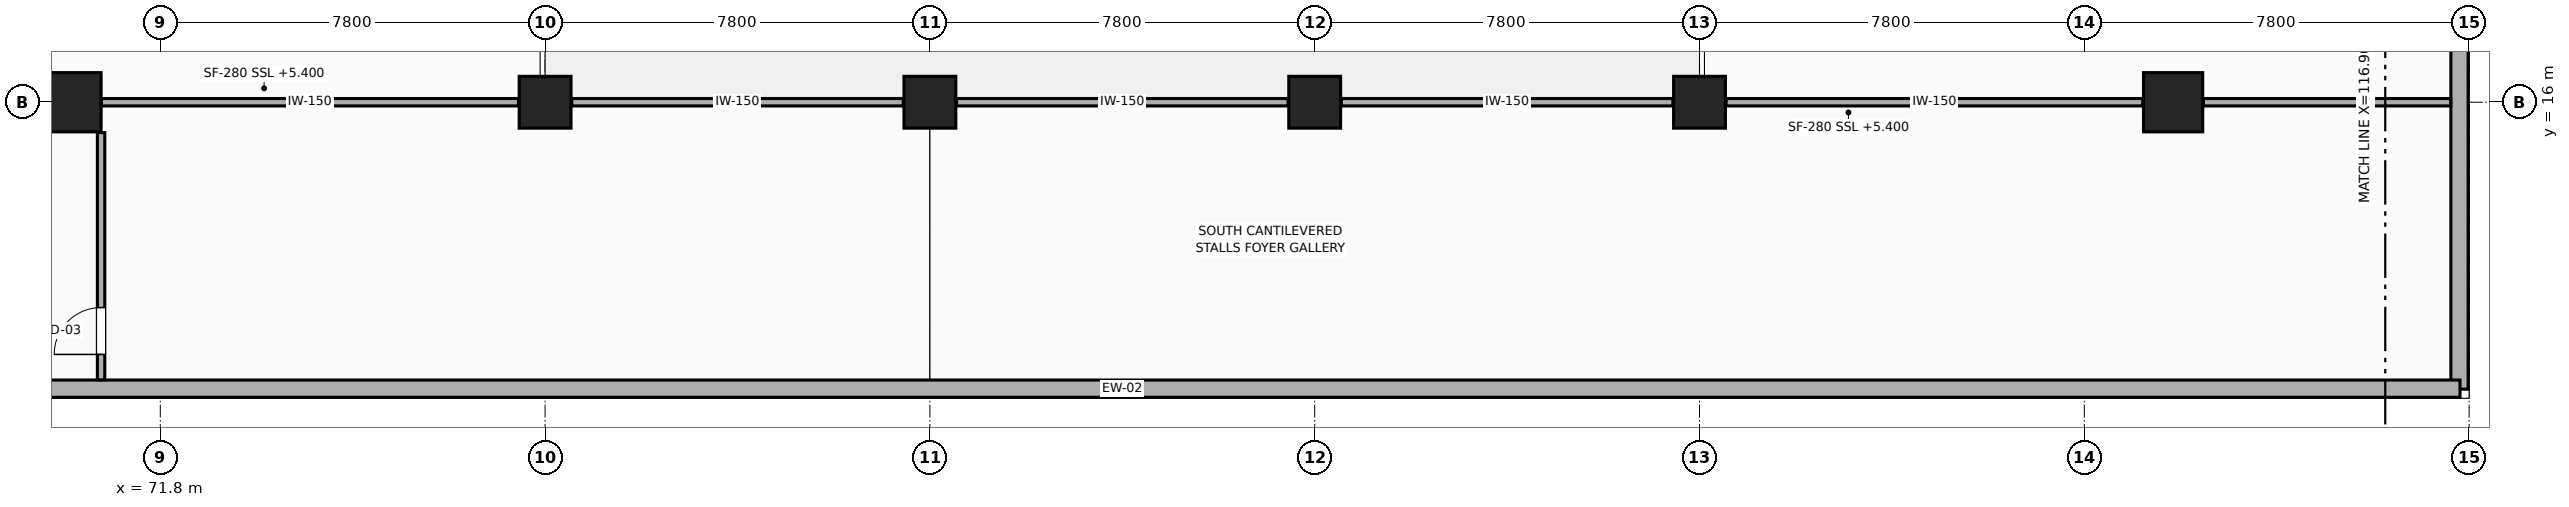
"""IFC4 building model, lengths in metres.
Left out: names, types, materials, properties, quantities, classifications, styles, units other than length and angle.
Written with IfcOpenShell. Run it as: python <this file> out.ifc"""

import sys

from ifc_helpers import new_model, si_unit, direction, frame, frame_2d, origin, origin_2d, place, context, subcontext, project, spatial, rectangle, extrude, element, fill, save


model = new_model("IFC4")
c1 = context("Model", 3, precision=1e-05, world=origin(), true_north=direction((0.0, 1.0)))
c2 = subcontext(c1, "Body", "Model", "MODEL_VIEW")
j1 = project(units=[si_unit("LENGTHUNIT", "METRE"), si_unit("PLANEANGLEUNIT", "RADIAN")], contexts=[c1])
p1 = place(None, origin())
s1 = spatial("IfcSite", under=j1, at=p1, CompositionType="ELEMENT")
p2 = place(p1, origin())
s2 = spatial("IfcBuilding", under=s1, at=p2, CompositionType="ELEMENT")
p3 = place(p2, frame((0.0, 0.0, 5.4)))
s3 = spatial("IfcBuildingStorey", under=s2, at=p3, CompositionType="ELEMENT", Elevation=5.4)
p4 = place(p3, frame((70.0, 16.0, 0.0), z_axis=(0.0, 0.0, 1.0), x_axis=(1.0, 0.0, 0.0)))
e1 = element("IfcColumn", 1, at=p4, inside=s3, PredefinedType="COLUMN", context=c2, shape_type="SweptSolid", body=[
    extrude(rectangle(XDim=1.2, YDim=1.2, at=origin_2d()), origin(), (0.0, 0.0, 1.0), 4.8),
])
for number, where, z_axis, x_axis in (
    (2, (79.6, 16.0, 0.0), (0.0, 0.0, 1.0), (1.0, 0.0, 0.0)),
    (3, (87.4, 16.0, 0.0), (0.0, 0.0, 1.0), (1.0, 0.0, 0.0)),
    (4, (95.2, 16.0, 0.0), (0.0, 0.0, 1.0), (1.0, 0.0, 0.0)),
    (5, (103.0, 16.0, 0.0), (0.0, 0.0, 1.0), (1.0, 0.0, 0.0)),
):
    element("IfcColumn", number, at=place(p3, frame(where, z_axis=z_axis, x_axis=x_axis)), inside=s3, PredefinedType="COLUMN", context=c2, shape_type="SweptSolid", body=[
        extrude(rectangle(XDim=1.05, YDim=1.05, at=origin_2d()), origin(), (0.0, 0.0, 1.0), 4.8),
    ])
p5 = place(p3, frame((112.6, 16.0, 0.0), z_axis=(0.0, 0.0, 1.0), x_axis=(1.0, 0.0, 0.0)))
e6 = element("IfcColumn", 6, at=p5, inside=s3, PredefinedType="COLUMN", context=c2, shape_type="SweptSolid", body=[
    extrude(rectangle(XDim=1.2, YDim=1.2, at=origin_2d()), origin(), (0.0, 0.0, 1.0), 4.8),
])
p6 = place(p3, frame((118.405, 23.815, 0.0), z_axis=(0.0, 0.0, 1.0), x_axis=(0.0, -1.0, 0.0)))
e7 = element("IfcWall", 7, at=p6, inside=s3, PredefinedType="STANDARD", context=c2, shape_type="SweptSolid", body=[
    extrude(rectangle(XDim=13.63, YDim=0.35, at=frame_2d((6.815, 0.0))), origin(), (0.0, 0.0, 1.0), 3.725),
])
p7 = place(p3, frame((118.415, 10.195, 0.0), z_axis=(0.0, 0.0, 1.0), x_axis=(-1.0, 0.0, 0.0)))
e8 = element("IfcWall", 8, at=p7, inside=s3, PredefinedType="STANDARD", context=c2, shape_type="SweptSolid", body=[
    extrude(rectangle(XDim=54.23, YDim=0.35, at=frame_2d((27.115, 0.0))), origin(), (0.0, 0.0, 1.0), 3.725),
])
p8 = place(p3, frame((70.604, 16.0, 0.0), z_axis=(0.0, 0.0, 1.0), x_axis=(1.0, 0.0, 0.0)))
e9 = element("IfcWall", 9, at=p8, inside=s3, PredefinedType="PARTITIONING", context=c2, shape_type="SweptSolid", body=[
    extrude(rectangle(XDim=8.456, YDim=0.15, at=frame_2d((4.228, 0.0))), origin(), (0.0, 0.0, 1.0), 3.72),
])
p9 = place(p3, frame((80.14, 16.0, 0.0), z_axis=(0.0, 0.0, 1.0), x_axis=(1.0, 0.0, 0.0)))
e10 = element("IfcWall", 10, at=p9, inside=s3, PredefinedType="PARTITIONING", context=c2, shape_type="SweptSolid", body=[
    extrude(rectangle(XDim=6.72, YDim=0.15, at=frame_2d((3.36, 0.0))), origin(), (0.0, 0.0, 1.0), 3.72),
])
for number, where, z_axis, x_axis in (
    (11, (87.94, 16.0, 0.0), (0.0, 0.0, 1.0), (1.0, 0.0, 0.0)),
    (12, (95.74, 16.0, 0.0), (0.0, 0.0, 1.0), (1.0, 0.0, 0.0)),
):
    element("IfcWall", number, at=place(p3, frame(where, z_axis=z_axis, x_axis=x_axis)), inside=s3, PredefinedType="PARTITIONING", context=c2, shape_type="SweptSolid", body=[
        extrude(rectangle(XDim=6.72, YDim=0.15, at=frame_2d((3.36, 0.0))), origin(), (0.0, 0.0, 1.0), 3.72),
    ])
p10 = place(p3, frame((103.54, 16.0, 0.0), z_axis=(0.0, 0.0, 1.0), x_axis=(1.0, 0.0, 0.0)))
e13 = element("IfcWall", 13, at=p10, inside=s3, PredefinedType="PARTITIONING", context=c2, shape_type="SweptSolid", body=[
    extrude(rectangle(XDim=8.445, YDim=0.15, at=frame_2d((4.223, 0.0))), origin(), (0.0, 0.0, 1.0), 3.72),
])
p11 = place(p3, frame((113.215, 16.0, 0.0), z_axis=(0.0, 0.0, 1.0), x_axis=(1.0, 0.0, 0.0)))
e14 = element("IfcWall", 14, at=p11, inside=s3, PredefinedType="PARTITIONING", context=c2, shape_type="SweptSolid", body=[
    extrude(rectangle(XDim=5.011, YDim=0.15, at=frame_2d((2.505, 0.0))), origin(), (0.0, 0.0, 1.0), 3.72),
])
p12 = place(p3, frame((70.6, 10.374, 0.0), z_axis=(0.0, 0.0, 1.0), x_axis=(0.0, 1.0, 0.0)))
e15 = element("IfcWall", 15, at=p12, inside=s3, PredefinedType="PARTITIONING", context=c2, shape_type="SweptSolid", body=[
    extrude(rectangle(XDim=5.011, YDim=0.15, at=frame_2d((2.505, 0.0))), origin(), (0.0, 0.0, 1.0), 3.72),
])
p13 = place(p12, frame((0.515, 0.0, 0.0)))
e16 = element("IfcOpeningElement", 16, at=p13, cuts=e15, PredefinedType="OPENING", context=c2, shape_type="SweptSolid", body=[
    extrude(rectangle(XDim=0.95, YDim=2.15, at=frame_2d((0.475, 1.075))), frame((0.0, 0.085, 0.0), z_axis=(0.0, -1.0, 0.0), x_axis=(1.0, 0.0, 0.0)), (0.0, 0.0, 1.0), 0.17),
])
p14 = place(p13, origin())
e17 = element("IfcDoor", 17, at=p14, inside=s3, OperationType="SINGLE_SWING_LEFT", PredefinedType="DOOR", context=c2, shape_type="SweptSolid", body=[
    extrude(rectangle(XDim=0.95, YDim=2.15, at=frame_2d((0.475, 1.075))), frame((0.0, 0.025, 0.0), z_axis=(0.0, -1.0, 0.0), x_axis=(1.0, 0.0, 0.0)), (0.0, 0.0, 1.0), 0.05),
])
fill(e16, e17)
save(model, sys.argv[1])
